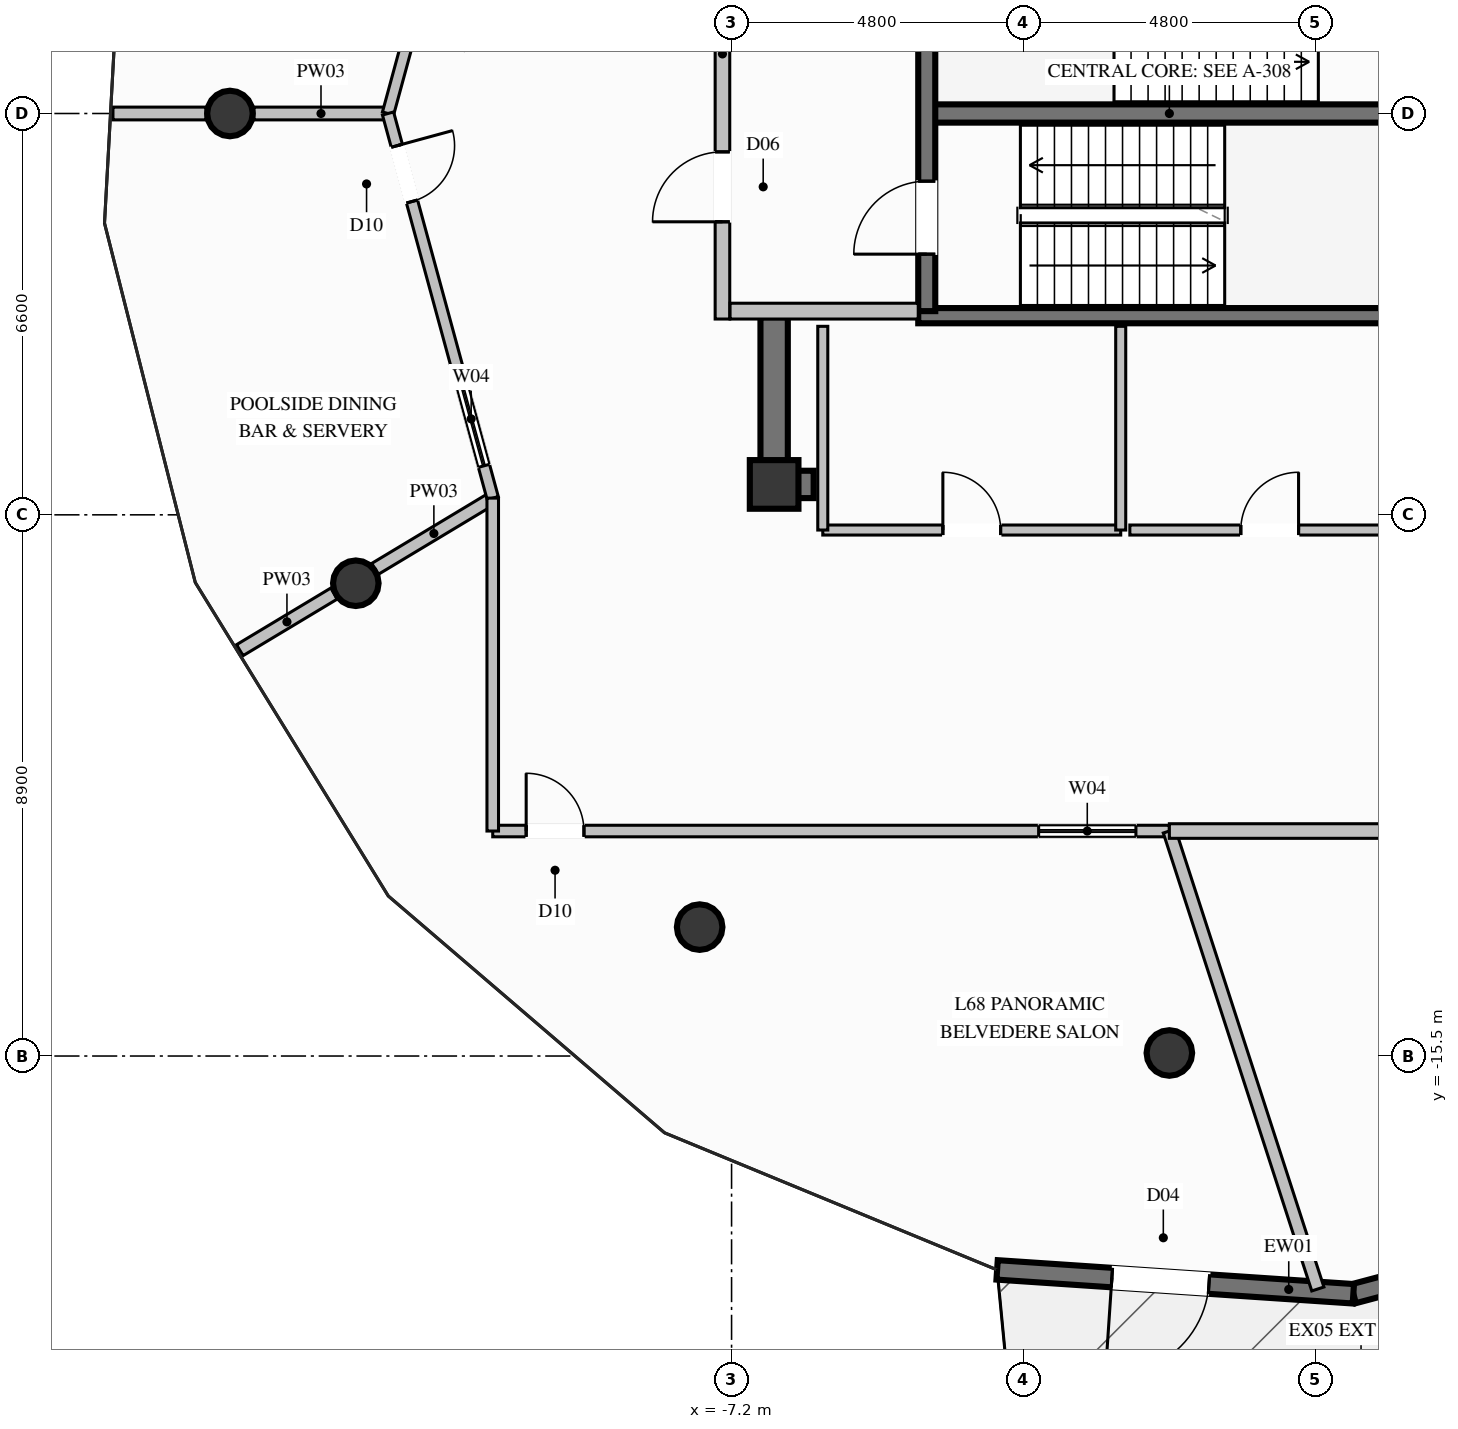
"""IFC4 building model, lengths in metres.
Left out: names, types, materials, properties, quantities, classifications, styles, units other than length and angle.
Written with IfcOpenShell. Run it as: python <this file> out.ifc"""

import sys

from ifc_helpers import new_model, si_unit, direction, frame, frame_2d, origin, origin_2d, place, context, subcontext, project, spatial, rectangle, circle, extrude, element, fill, save


model = new_model("IFC4")
c1 = context("Model", 3, precision=1e-05, world=origin(), true_north=direction((0.0, 1.0)))
c2 = subcontext(c1, "Body", "Model", "MODEL_VIEW")
j1 = project(units=[si_unit("LENGTHUNIT", "METRE"), si_unit("PLANEANGLEUNIT", "RADIAN")], contexts=[c1])
p1 = place(None, origin())
s1 = spatial("IfcSite", under=j1, at=p1, CompositionType="ELEMENT")
p2 = place(p1, origin())
s2 = spatial("IfcBuilding", under=s1, at=p2, CompositionType="ELEMENT")
p3 = place(p2, frame((0.0, 0.0, 262.0)))
s3 = spatial("IfcBuildingStorey", under=s2, at=p3, CompositionType="ELEMENT", Elevation=262.0)
p4 = place(p3, frame((-6.5, -6.1, 0.0), z_axis=(0.0, 0.0, 1.0), x_axis=(1.0, 0.0, 0.0)))
e1 = element("IfcColumn", 1, at=p4, inside=s3, PredefinedType="COLUMN", context=c2, shape_type="SweptSolid", body=[
    extrude(rectangle(XDim=0.8, YDim=0.8, at=origin_2d()), origin(), (0.0, 0.0, 1.0), 4.8),
])
p5 = place(p3, frame((-3.99, 0.0, 0.0), z_axis=(0.0, 0.0, 1.0), x_axis=(1.0, 0.0, 0.0)))
e2 = element("IfcWall", 2, at=p5, inside=s3, PredefinedType="SHEAR", context=c2, shape_type="SweptSolid", body=[
    extrude(rectangle(XDim=7.98, YDim=0.3, at=frame_2d((3.99, 0.0))), origin(), (0.0, 0.0, 1.0), 4.8),
])
p6 = place(p3, frame((-4.13, -3.325, 0.0), z_axis=(0.0, 0.0, 1.0), x_axis=(1.0, 0.0, 0.0)))
e3 = element("IfcWall", 3, at=p6, inside=s3, PredefinedType="SOLIDWALL", context=c2, shape_type="SweptSolid", body=[
    extrude(rectangle(XDim=8.26, YDim=0.25, at=frame_2d((4.13, 0.0))), origin(), (0.0, 0.0, 1.0), 4.8),
])
p7 = place(p3, frame((-6.275, -6.1, 0.0), z_axis=(0.0, 0.0, 1.0), x_axis=(1.0, 0.0, 0.0)))
e4 = element("IfcWall", 4, at=p7, inside=s3, PredefinedType="SHEAR", context=c2, shape_type="SweptSolid", body=[
    extrude(rectangle(XDim=0.425, YDim=0.45, at=frame_2d((0.212, 0.0))), origin(), (0.0, 0.0, 1.0), 4.8),
])
p8 = place(p3, frame((-6.5, -6.325, 0.0), z_axis=(0.0, 0.0, 1.0), x_axis=(0.0, 1.0, 0.0)))
e5 = element("IfcWall", 5, at=p8, inside=s3, PredefinedType="SHEAR", context=c2, shape_type="SweptSolid", body=[
    extrude(rectangle(XDim=2.975, YDim=0.45, at=frame_2d((1.487, 0.0))), origin(), (0.0, 0.0, 1.0), 4.8),
])
for number, where, z_axis, x_axis in (
    (6, (-15.45, 0.0, 0.0), (0.0, 0.0, 1.0), (1.0, 0.0, 0.0)),
    (7, (-13.38, -7.725, 0.0), (0.0, 0.0, 1.0), (1.0, 0.0, 0.0)),
    (8, (-7.725, -13.38, 0.0), (0.0, 0.0, 1.0), (1.0, 0.0, 0.0)),
    (9, (0.0, -15.45, 0.0), (0.0, 0.0, 1.0), (1.0, 0.0, 0.0)),
):
    element("IfcColumn", number, at=place(p3, frame(where, z_axis=z_axis, x_axis=x_axis)), inside=s3, PredefinedType="COLUMN", context=c2, shape_type="SweptSolid", body=[
        extrude(circle(Radius=0.375, at=origin_2d()), origin(), (0.0, 0.0, 1.0), 4.8),
    ])
p9 = place(p3, frame((8.701, -17.902, 0.0), z_axis=(0.0, 0.0, 1.0), x_axis=(-0.966469167261, -0.256782687761, 0.0)))
e10 = element("IfcWall", 10, at=p9, inside=s3, PredefinedType="SOLIDWALL", context=c2, shape_type="SweptSolid", body=[
    extrude(rectangle(XDim=5.872, YDim=0.32, at=frame_2d((2.936, 0.0))), origin(), (0.0, 0.0, 1.0), 4.57),
])
p10 = place(p9, frame((2.136, 0.0, 0.0)))
e11 = element("IfcOpeningElement", 11, at=p10, cuts=e10, PredefinedType="OPENING", context=c2, shape_type="SweptSolid", body=[
    extrude(rectangle(XDim=1.6, YDim=2.3, at=frame_2d((0.8, 1.15))), frame((0.0, 0.17, 0.0), z_axis=(0.0, -1.0, 0.0), x_axis=(1.0, 0.0, 0.0)), (0.0, 0.0, 1.0), 0.34),
])
p11 = place(p3, frame((3.026, -19.41, 0.0), z_axis=(0.0, 0.0, 1.0), x_axis=(-0.997759882604, 0.066897060218, 0.0)))
e12 = element("IfcWall", 12, at=p11, inside=s3, PredefinedType="SOLIDWALL", context=c2, shape_type="SweptSolid", body=[
    extrude(rectangle(XDim=5.872, YDim=0.32, at=frame_2d((2.936, 0.0))), origin(), (0.0, 0.0, 1.0), 4.57),
])
p12 = place(p11, frame((2.38, 0.0, 0.0)))
e13 = element("IfcOpeningElement", 13, at=p12, cuts=e12, PredefinedType="OPENING", context=c2, shape_type="SweptSolid", body=[
    extrude(rectangle(XDim=1.6, YDim=2.3, at=frame_2d((0.8, 1.15))), frame((0.0, 0.17, 0.0), z_axis=(0.0, -1.0, 0.0), x_axis=(1.0, 0.0, 0.0)), (0.0, 0.0, 1.0), 0.34),
])
p13 = place(p3, frame((-3.99, -3.25, 0.0), z_axis=(0.0, 0.0, 1.0), x_axis=(0.0, 1.0, 0.0)))
e14 = element("IfcWall", 14, at=p13, inside=s3, PredefinedType="SOLIDWALL", context=c2, shape_type="SweptSolid", body=[
    extrude(rectangle(XDim=5.46, YDim=0.28, at=frame_2d((2.73, 0.0))), origin(), (0.0, 0.0, 1.0), 4.57),
])
p14 = place(p13, frame((0.937, 0.0, 0.0)))
e15 = element("IfcOpeningElement", 15, at=p14, cuts=e14, PredefinedType="OPENING", context=c2, shape_type="SweptSolid", body=[
    extrude(rectangle(XDim=1.2, YDim=2.2, at=frame_2d((0.6, 1.1))), frame((0.0, 0.15, 0.0), z_axis=(0.0, -1.0, 0.0), x_axis=(1.0, 0.0, 0.0)), (0.0, 0.0, 1.0), 0.3),
])
p15 = place(p3, frame((-7.35, -3.38, 0.0), z_axis=(0.0, 0.0, 1.0), x_axis=(0.0, 1.0, 0.0)))
e16 = element("IfcWall", 16, at=p15, inside=s3, PredefinedType="PARTITIONING", context=c2, shape_type="SweptSolid", body=[
    extrude(rectangle(XDim=5.72, YDim=0.24, at=frame_2d((2.86, 0.0))), origin(), (0.0, 0.0, 1.0), 3.455),
])
p16 = place(p15, frame((1.599, 0.0, 0.0)))
e17 = element("IfcOpeningElement", 17, at=p16, cuts=e16, PredefinedType="OPENING", context=c2, shape_type="SweptSolid", body=[
    extrude(rectangle(XDim=1.15, YDim=2.2, at=frame_2d((0.575, 1.1))), frame((0.0, 0.13, 0.0), z_axis=(0.0, -1.0, 0.0), x_axis=(1.0, 0.0, 0.0)), (0.0, 0.0, 1.0), 0.26),
])
p17 = place(p3, frame((-7.225, -3.25, 0.0), z_axis=(0.0, 0.0, 1.0), x_axis=(1.0, 0.0, 0.0)))
e18 = element("IfcWall", 18, at=p17, inside=s3, PredefinedType="PARTITIONING", context=c2, shape_type="SweptSolid", body=[
    extrude(rectangle(XDim=3.095, YDim=0.26, at=frame_2d((1.548, 0.0))), origin(), (0.0, 0.0, 1.0), 4.57),
])
p18 = place(p3, frame((-5.7, -6.85, 0.0), z_axis=(0.0, 0.0, 1.0), x_axis=(1.0, 0.0, 0.0)))
e19 = element("IfcWall", 19, at=p18, inside=s3, PredefinedType="PARTITIONING", context=c2, shape_type="SweptSolid", body=[
    extrude(rectangle(XDim=4.9, YDim=0.165, at=frame_2d((2.45, 0.0))), origin(), (0.0, 0.0, 1.0), 3.455),
])
p19 = place(p18, frame((1.975, 0.0, 0.0)))
e20 = element("IfcOpeningElement", 20, at=p19, cuts=e19, PredefinedType="OPENING", context=c2, shape_type="SweptSolid", body=[
    extrude(rectangle(XDim=0.95, YDim=2.1, at=frame_2d((0.475, 1.05))), frame((0.0, 0.093, 0.0), z_axis=(0.0, -1.0, 0.0), x_axis=(1.0, 0.0, 0.0)), (0.0, 0.0, 1.0), 0.185),
])
p20 = place(p3, frame((-0.8, -6.85, 0.0), z_axis=(0.0, 0.0, 1.0), x_axis=(0.0, 1.0, 0.0)))
e21 = element("IfcWall", 21, at=p20, inside=s3, PredefinedType="PARTITIONING", context=c2, shape_type="SweptSolid", body=[
    extrude(rectangle(XDim=3.35, YDim=0.165, at=frame_2d((1.675, 0.0))), origin(), (0.0, 0.0, 1.0), 4.57),
])
p21 = place(p3, frame((-5.7, -3.5, 0.0), z_axis=(0.0, 0.0, 1.0), x_axis=(0.0, -1.0, 0.0)))
e22 = element("IfcWall", 22, at=p21, inside=s3, PredefinedType="PARTITIONING", context=c2, shape_type="SweptSolid", body=[
    extrude(rectangle(XDim=3.35, YDim=0.165, at=frame_2d((1.675, 0.0))), origin(), (0.0, 0.0, 1.0), 3.455),
])
p22 = place(p3, frame((-0.65, -6.85, 0.0), z_axis=(0.0, 0.0, 1.0), x_axis=(1.0, 0.0, 0.0)))
e23 = element("IfcWall", 23, at=p22, inside=s3, PredefinedType="PARTITIONING", context=c2, shape_type="SweptSolid", body=[
    extrude(rectangle(XDim=4.6, YDim=0.165, at=frame_2d((2.3, 0.0))), origin(), (0.0, 0.0, 1.0), 3.455),
])
p23 = place(p22, frame((1.825, 0.0, 0.0)))
e24 = element("IfcOpeningElement", 24, at=p23, cuts=e23, PredefinedType="OPENING", context=c2, shape_type="SweptSolid", body=[
    extrude(rectangle(XDim=0.95, YDim=2.1, at=frame_2d((0.475, 1.05))), frame((0.0, 0.093, 0.0), z_axis=(0.0, -1.0, 0.0), x_axis=(1.0, 0.0, 0.0)), (0.0, 0.0, 1.0), 0.185),
])
p24 = place(p3, frame((-12.85, 0.0, 0.0), z_axis=(0.0, 0.0, 1.0), x_axis=(-1.0, 0.0, 0.0)))
e25 = element("IfcWall", 25, at=p24, inside=s3, PredefinedType="PARTITIONING", context=c2, shape_type="SweptSolid", body=[
    extrude(rectangle(XDim=2.205, YDim=0.21, at=frame_2d((1.103, 0.0))), origin(), (0.0, 0.0, 1.0), 4.57),
])
p25 = place(p3, frame((-15.845, 0.0, 0.0), z_axis=(0.0, 0.0, 1.0), x_axis=(-1.0, 0.0, 0.0)))
e26 = element("IfcWall", 26, at=p25, inside=s3, PredefinedType="PARTITIONING", context=c2, shape_type="SweptSolid", body=[
    extrude(rectangle(XDim=1.529, YDim=0.21, at=frame_2d((0.765, 0.0))), origin(), (0.0, 0.0, 1.0), 4.57),
])
p26 = place(p3, frame((-11.128, -6.325, 0.0), z_axis=(0.0, 0.0, 1.0), x_axis=(-0.857015766595, -0.515290186018, 0.0)))
e27 = element("IfcWall", 27, at=p26, inside=s3, PredefinedType="PARTITIONING", context=c2, shape_type="SweptSolid", body=[
    extrude(rectangle(XDim=2.259, YDim=0.21, at=frame_2d((1.129, 0.0))), origin(), (0.0, 0.0, 1.0), 4.011),
])
p27 = place(p3, frame((-13.737, -7.894, 0.0), z_axis=(0.0, 0.0, 1.0), x_axis=(-0.857183235, -0.515011554855, 0.0)))
e28 = element("IfcWall", 28, at=p27, inside=s3, PredefinedType="PARTITIONING", context=c2, shape_type="SweptSolid", body=[
    extrude(rectangle(XDim=1.809, YDim=0.21, at=frame_2d((0.905, 0.0))), origin(), (0.0, 0.0, 1.0), 4.57),
])
p28 = place(p3, frame((-11.903, 3.479, 0.0), z_axis=(0.0, 0.0, 1.0), x_axis=(-0.262653290471, -0.964890278221, 0.0)))
e29 = element("IfcWall", 29, at=p28, inside=s3, PredefinedType="PARTITIONING", context=c2, shape_type="SweptSolid", body=[
    extrude(rectangle(XDim=3.606, YDim=0.19, at=frame_2d((1.803, 0.0))), origin(), (0.0, 0.0, 1.0), 4.57),
])
p29 = place(p28, frame((1.328, 0.0, 0.0)))
e30 = element("IfcOpeningElement", 30, at=p29, cuts=e29, PredefinedType="OPENING", context=c2, shape_type="SweptSolid", body=[
    extrude(rectangle(XDim=0.95, YDim=2.1, at=frame_2d((0.475, 1.05))), frame((0.0, 0.105, 0.0), z_axis=(0.0, -1.0, 0.0), x_axis=(1.0, 0.0, 0.0)), (0.0, 0.0, 1.0), 0.21),
])
p30 = place(p3, frame((-12.85, 0.0, 0.0), z_axis=(0.0, 0.0, 1.0), x_axis=(0.262717156474, -0.964872890952, 0.0)))
e31 = element("IfcWall", 31, at=p30, inside=s3, PredefinedType="PARTITIONING", context=c2, shape_type="SweptSolid", body=[
    extrude(rectangle(XDim=6.555, YDim=0.19, at=frame_2d((3.278, 0.0))), origin(), (0.0, 0.0, 1.0), 4.57),
])
p31 = place(p30, frame((0.55, 0.0, 0.0)))
e32 = element("IfcOpeningElement", 32, at=p31, cuts=e31, PredefinedType="OPENING", context=c2, shape_type="SweptSolid", body=[
    extrude(rectangle(XDim=0.95, YDim=2.1, at=frame_2d((0.475, 1.05))), frame((0.0, 0.105, 0.0), z_axis=(0.0, -1.0, 0.0), x_axis=(1.0, 0.0, 0.0)), (0.0, 0.0, 1.0), 0.21),
])
p32 = place(p30, frame((4.405, 0.0, 0.9)))
e33 = element("IfcOpeningElement", 33, at=p32, cuts=e31, PredefinedType="OPENING", context=c2, shape_type="SweptSolid", body=[
    extrude(rectangle(XDim=1.6, YDim=1.4, at=frame_2d((0.8, 0.7))), frame((0.0, 0.105, 0.0), z_axis=(0.0, -1.0, 0.0), x_axis=(1.0, 0.0, 0.0)), (0.0, 0.0, 1.0), 0.21),
])
p33 = place(p3, frame((-11.128, -11.8, 0.0), z_axis=(0.0, 0.0, 1.0), x_axis=(1.0, 0.0, 0.0)))
e34 = element("IfcWall", 34, at=p33, inside=s3, PredefinedType="PARTITIONING", context=c2, shape_type="SweptSolid", body=[
    extrude(rectangle(XDim=11.128, YDim=0.19, at=frame_2d((5.564, 0.0))), origin(), (0.0, 0.0, 1.0), 4.57),
])
p34 = place(p33, frame((0.55, 0.0, 0.0)))
e35 = element("IfcOpeningElement", 35, at=p34, cuts=e34, PredefinedType="OPENING", context=c2, shape_type="SweptSolid", body=[
    extrude(rectangle(XDim=0.95, YDim=2.1, at=frame_2d((0.475, 1.05))), frame((0.0, 0.105, 0.0), z_axis=(0.0, -1.0, 0.0), x_axis=(1.0, 0.0, 0.0)), (0.0, 0.0, 1.0), 0.21),
])
p35 = place(p33, frame((8.978, 0.0, 0.9)))
e36 = element("IfcOpeningElement", 36, at=p35, cuts=e34, PredefinedType="OPENING", context=c2, shape_type="SweptSolid", body=[
    extrude(rectangle(XDim=1.6, YDim=1.4, at=frame_2d((0.8, 0.7))), frame((0.0, 0.105, 0.0), z_axis=(0.0, -1.0, 0.0), x_axis=(1.0, 0.0, 0.0)), (0.0, 0.0, 1.0), 0.21),
])
p36 = place(p3, frame((-11.128, -6.325, 0.0), z_axis=(0.0, 0.0, 1.0), x_axis=(0.0, -1.0, 0.0)))
e37 = element("IfcWall", 37, at=p36, inside=s3, PredefinedType="PARTITIONING", context=c2, shape_type="SweptSolid", body=[
    extrude(rectangle(XDim=5.475, YDim=0.19, at=frame_2d((2.738, 0.0))), origin(), (0.0, 0.0, 1.0), 4.57),
])
p37 = place(p3, frame((0.0, -11.8, 0.0), z_axis=(0.0, 0.0, 1.0), x_axis=(0.308436826184, -0.951244828766, 0.0)))
e38 = element("IfcWall", 38, at=p37, inside=s3, PredefinedType="PARTITIONING", context=c2, shape_type="SweptSolid", body=[
    extrude(rectangle(XDim=7.917, YDim=0.21, at=frame_2d((3.958, 0.0))), origin(), (0.0, 0.0, 1.0), 4.57),
])
p38 = place(p3, frame((0.0, -11.8, 0.0), z_axis=(0.0, 0.0, 1.0), x_axis=(1.0, 0.0, 0.0)))
e39 = element("IfcWall", 39, at=p38, inside=s3, PredefinedType="PARTITIONING", context=c2, shape_type="SweptSolid", body=[
    extrude(rectangle(XDim=11.128, YDim=0.24, at=frame_2d((5.564, 0.0))), origin(), (0.0, 0.0, 1.0), 4.57),
])
p39 = place(p38, frame((5.089, 0.0, 0.0)))
e40 = element("IfcOpeningElement", 40, at=p39, cuts=e39, PredefinedType="OPENING", context=c2, shape_type="SweptSolid", body=[
    extrude(rectangle(XDim=0.95, YDim=2.1, at=frame_2d((0.475, 1.05))), frame((0.0, 0.13, 0.0), z_axis=(0.0, -1.0, 0.0), x_axis=(1.0, 0.0, 0.0)), (0.0, 0.0, 1.0), 0.26),
])
p40 = place(p12, origin())
e41 = element("IfcDoor", 41, at=p40, inside=s3, OperationType="SINGLE_SWING_RIGHT", PredefinedType="DOOR", context=c2, shape_type="SweptSolid", body=[
    extrude(rectangle(XDim=1.6, YDim=2.3, at=frame_2d((0.8, 1.15))), frame((0.0, 0.025, 0.0), z_axis=(0.0, -1.0, 0.0), x_axis=(1.0, 0.0, 0.0)), (0.0, 0.0, 1.0), 0.05),
])
fill(e13, e41)
p41 = place(p14, origin())
e42 = element("IfcDoor", 42, at=p41, inside=s3, OperationType="SINGLE_SWING_LEFT", PredefinedType="DOOR", context=c2, shape_type="SweptSolid", body=[
    extrude(rectangle(XDim=1.2, YDim=2.2, at=frame_2d((0.6, 1.1))), frame((0.0, 0.025, 0.0), z_axis=(0.0, -1.0, 0.0), x_axis=(1.0, 0.0, 0.0)), (0.0, 0.0, 1.0), 0.05),
])
fill(e15, e42)
p42 = place(p16, origin())
e43 = element("IfcDoor", 43, at=p42, inside=s3, OperationType="SINGLE_SWING_LEFT", PredefinedType="DOOR", context=c2, shape_type="SweptSolid", body=[
    extrude(rectangle(XDim=1.15, YDim=2.2, at=frame_2d((0.575, 1.1))), frame((0.0, 0.025, 0.0), z_axis=(0.0, -1.0, 0.0), x_axis=(1.0, 0.0, 0.0)), (0.0, 0.0, 1.0), 0.05),
])
fill(e17, e43)
p43 = place(p19, origin())
e44 = element("IfcDoor", 44, at=p43, inside=s3, OperationType="SINGLE_SWING_LEFT", PredefinedType="DOOR", context=c2, shape_type="SweptSolid", body=[
    extrude(rectangle(XDim=0.95, YDim=2.1, at=frame_2d((0.475, 1.05))), frame((0.0, 0.025, 0.0), z_axis=(0.0, -1.0, 0.0), x_axis=(1.0, 0.0, 0.0)), (0.0, 0.0, 1.0), 0.05),
])
fill(e20, e44)
p44 = place(p23, origin())
e45 = element("IfcDoor", 45, at=p44, inside=s3, OperationType="SINGLE_SWING_RIGHT", PredefinedType="DOOR", context=c2, shape_type="SweptSolid", body=[
    extrude(rectangle(XDim=0.95, YDim=2.1, at=frame_2d((0.475, 1.05))), frame((0.0, 0.025, 0.0), z_axis=(0.0, -1.0, 0.0), x_axis=(1.0, 0.0, 0.0)), (0.0, 0.0, 1.0), 0.05),
])
fill(e24, e45)
p45 = place(p31, origin())
e46 = element("IfcDoor", 46, at=p45, inside=s3, OperationType="SINGLE_SWING_LEFT", PredefinedType="DOOR", context=c2, shape_type="SweptSolid", body=[
    extrude(rectangle(XDim=0.95, YDim=2.1, at=frame_2d((0.475, 1.05))), frame((0.0, 0.025, 0.0), z_axis=(0.0, -1.0, 0.0), x_axis=(1.0, 0.0, 0.0)), (0.0, 0.0, 1.0), 0.05),
])
fill(e32, e46)
p46 = place(p32, origin())
e47 = element("IfcWindow", 47, at=p46, inside=s3, PartitioningType="SINGLE_PANEL", PredefinedType="WINDOW", context=c2, shape_type="SweptSolid", body=[
    extrude(rectangle(XDim=1.6, YDim=1.4, at=frame_2d((0.8, 0.7))), frame((0.0, 0.03, 0.0), z_axis=(0.0, -1.0, 0.0), x_axis=(1.0, 0.0, 0.0)), (0.0, 0.0, 1.0), 0.06),
])
fill(e33, e47)
p47 = place(p34, origin())
e48 = element("IfcDoor", 48, at=p47, inside=s3, OperationType="SINGLE_SWING_LEFT", PredefinedType="DOOR", context=c2, shape_type="SweptSolid", body=[
    extrude(rectangle(XDim=0.95, YDim=2.1, at=frame_2d((0.475, 1.05))), frame((0.0, 0.025, 0.0), z_axis=(0.0, -1.0, 0.0), x_axis=(1.0, 0.0, 0.0)), (0.0, 0.0, 1.0), 0.05),
])
fill(e35, e48)
p48 = place(p35, origin())
e49 = element("IfcWindow", 49, at=p48, inside=s3, PartitioningType="SINGLE_PANEL", PredefinedType="WINDOW", context=c2, shape_type="SweptSolid", body=[
    extrude(rectangle(XDim=1.6, YDim=1.4, at=frame_2d((0.8, 0.7))), frame((0.0, 0.03, 0.0), z_axis=(0.0, -1.0, 0.0), x_axis=(1.0, 0.0, 0.0)), (0.0, 0.0, 1.0), 0.06),
])
fill(e36, e49)
save(model, sys.argv[1])
